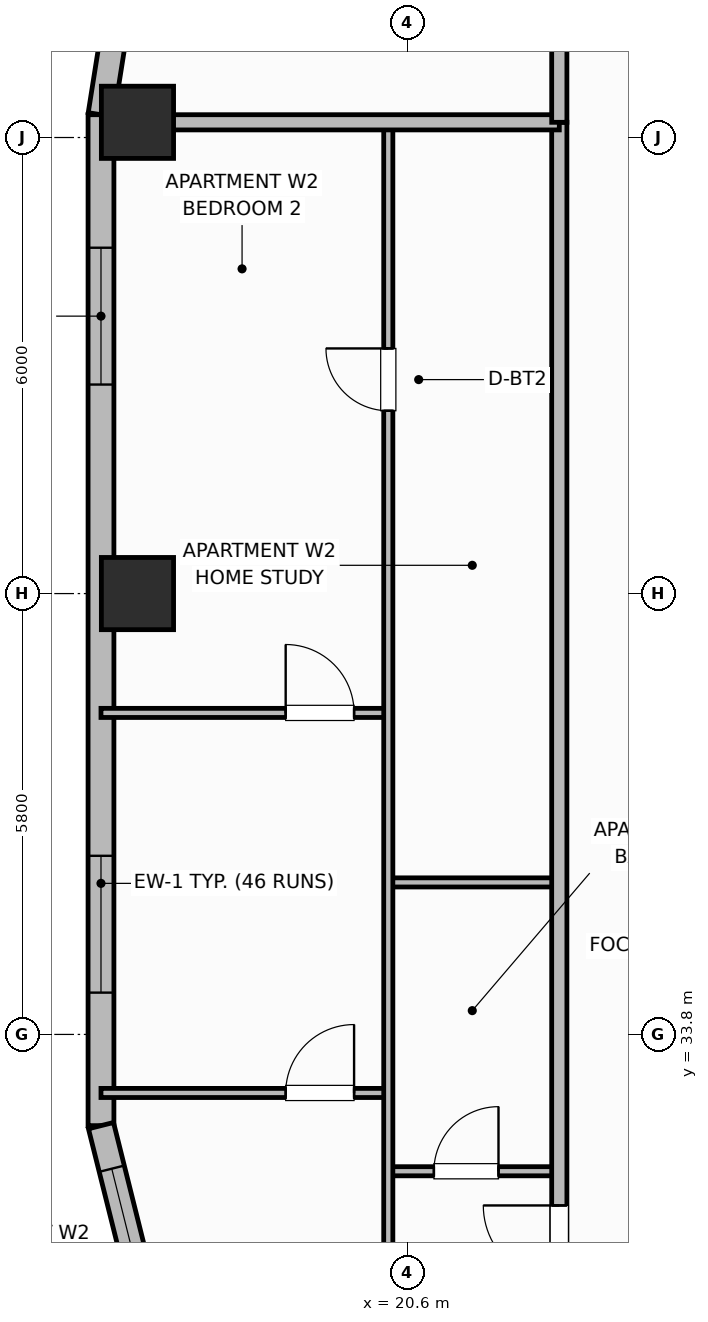
"""IFC4 building model, lengths in metres.
Left out: names, types, materials, properties, quantities, classifications, styles, units other than length and angle.
Written with IfcOpenShell. Run it as: python <this file> out.ifc"""

import sys

from ifc_helpers import new_model, si_unit, direction, frame, frame_2d, origin, origin_2d, place, context, subcontext, project, spatial, rectangle, extrude, element, fill, save


model = new_model("IFC4")
c1 = context("Model", 3, precision=1e-05, world=origin(), true_north=direction((0.0, 1.0)))
c2 = subcontext(c1, "Body", "Model", "MODEL_VIEW")
j1 = project(units=[si_unit("LENGTHUNIT", "METRE"), si_unit("PLANEANGLEUNIT", "RADIAN")], contexts=[c1])
p1 = place(None, origin())
s1 = spatial("IfcSite", under=j1, at=p1, CompositionType="ELEMENT")
p2 = place(p1, origin())
s2 = spatial("IfcBuilding", under=s1, at=p2, CompositionType="ELEMENT")
p3 = place(p2, frame((0.0, 0.0, 147.8)))
s3 = spatial("IfcBuildingStorey", under=s2, at=p3, CompositionType="ELEMENT", Elevation=147.8)
for number, where, z_axis, x_axis in (
    (1, (17.05, 39.6, 0.0), (0.0, 0.0, 1.0), (1.0, 0.0, 0.0)),
    (2, (17.05, 45.8, 0.0), (0.0, 0.0, 1.0), (1.0, 0.0, 0.0)),
):
    element("IfcColumn", number, at=place(p3, frame(where, z_axis=z_axis, x_axis=x_axis)), inside=s3, PredefinedType="COLUMN", context=c2, shape_type="SweptSolid", body=[
        extrude(rectangle(XDim=0.95, YDim=0.95, at=origin_2d()), origin(), (0.0, 0.0, 1.0), 3.7),
    ])
p4 = place(p3, frame((16.748, 47.022, 0.0), z_axis=(0.0, 0.0, 1.0), x_axis=(-0.156481329164, -0.987680916907, 0.0)))
e3 = element("IfcWall", 3, at=p4, inside=s3, PredefinedType="SOLIDWALL", context=c2, shape_type="SweptSolid", body=[
    extrude(rectangle(XDim=1.136, YDim=0.34, at=frame_2d((0.568, 0.0))), origin(), (0.0, 0.0, 1.0), 2.72),
])
p5 = place(p3, frame((16.57, 45.9, 0.0), z_axis=(0.0, 0.0, 1.0), x_axis=(0.0, -1.0, 0.0)))
e4 = element("IfcWall", 4, at=p5, inside=s3, PredefinedType="SOLIDWALL", context=c2, shape_type="SweptSolid", body=[
    extrude(rectangle(XDim=13.3, YDim=0.34, at=frame_2d((6.65, 0.0))), origin(), (0.0, 0.0, 1.0), 2.72),
])
p6 = place(p5, frame((1.75, 0.0, 0.75)))
e5 = element("IfcOpeningElement", 5, at=p6, cuts=e4, PredefinedType="OPENING", context=c2, shape_type="SweptSolid", body=[
    extrude(rectangle(XDim=1.8, YDim=1.85, at=frame_2d((0.9, 0.925))), frame((0.0, 0.18, 0.0), z_axis=(0.0, -1.0, 0.0), x_axis=(1.0, 0.0, 0.0)), (0.0, 0.0, 1.0), 0.36),
])
p7 = place(p5, frame((9.75, 0.0, 0.75)))
e6 = element("IfcOpeningElement", 6, at=p7, cuts=e4, PredefinedType="OPENING", context=c2, shape_type="SweptSolid", body=[
    extrude(rectangle(XDim=1.8, YDim=1.85, at=frame_2d((0.9, 0.925))), frame((0.0, 0.18, 0.0), z_axis=(0.0, -1.0, 0.0), x_axis=(1.0, 0.0, 0.0)), (0.0, 0.0, 1.0), 0.36),
])
p8 = place(p3, frame((16.57, 32.6, 0.0), z_axis=(0.0, 0.0, 1.0), x_axis=(0.242535625036, -0.970142500145, 0.0)))
e7 = element("IfcWall", 7, at=p8, inside=s3, PredefinedType="SOLIDWALL", context=c2, shape_type="SweptSolid", body=[
    extrude(rectangle(XDim=2.268, YDim=0.34, at=frame_2d((1.134, 0.0))), origin(), (0.0, 0.0, 1.0), 2.72),
])
p9 = place(p8, frame((0.584, 0.0, 0.91)))
e8 = element("IfcOpeningElement", 8, at=p9, cuts=e7, PredefinedType="OPENING", context=c2, shape_type="SweptSolid", body=[
    extrude(rectangle(XDim=1.1, YDim=1.65, at=frame_2d((0.55, 0.825))), frame((0.0, 0.18, 0.0), z_axis=(0.0, -1.0, 0.0), x_axis=(1.0, 0.0, 0.0)), (0.0, 0.0, 1.0), 0.36),
])
p10 = place(p3, frame((20.35, 32.0, 0.0), z_axis=(0.0, 0.0, 1.0), x_axis=(1.0, 0.0, 0.0)))
e9 = element("IfcWall", 9, at=p10, inside=s3, PredefinedType="PARTITIONING", context=c2, shape_type="SweptSolid", body=[
    extrude(rectangle(XDim=2.25, YDim=0.12, at=frame_2d((1.125, 0.0))), origin(), (0.0, 0.0, 1.0), 2.55),
])
p11 = place(p10, frame((0.6, 0.0, 0.0)))
e10 = element("IfcOpeningElement", 10, at=p11, cuts=e9, PredefinedType="OPENING", context=c2, shape_type="SweptSolid", body=[
    extrude(rectangle(XDim=0.85, YDim=2.1, at=frame_2d((0.425, 1.05))), frame((0.0, 0.07, 0.0), z_axis=(0.0, -1.0, 0.0), x_axis=(1.0, 0.0, 0.0)), (0.0, 0.0, 1.0), 0.14),
])
p12 = place(p3, frame((20.35, 35.8, 0.0), z_axis=(0.0, 0.0, 1.0), x_axis=(1.0, 0.0, 0.0)))
e11 = element("IfcWall", 11, at=p12, inside=s3, PredefinedType="PARTITIONING", context=c2, shape_type="SweptSolid", body=[
    extrude(rectangle(XDim=2.25, YDim=0.12, at=frame_2d((1.125, 0.0))), origin(), (0.0, 0.0, 1.0), 2.55),
])
p13 = place(p3, frame((16.57, 33.03, 0.0), z_axis=(0.0, 0.0, 1.0), x_axis=(1.0, 0.0, 0.0)))
e12 = element("IfcWall", 12, at=p13, inside=s3, PredefinedType="PARTITIONING", context=c2, shape_type="SweptSolid", body=[
    extrude(rectangle(XDim=3.78, YDim=0.12, at=frame_2d((1.89, 0.0))), origin(), (0.0, 0.0, 1.0), 2.55),
])
p14 = place(p13, frame((2.43, 0.0, 0.0)))
e13 = element("IfcOpeningElement", 13, at=p14, cuts=e12, PredefinedType="OPENING", context=c2, shape_type="SweptSolid", body=[
    extrude(rectangle(XDim=0.9, YDim=2.1, at=frame_2d((0.45, 1.05))), frame((0.0, 0.07, 0.0), z_axis=(0.0, -1.0, 0.0), x_axis=(1.0, 0.0, 0.0)), (0.0, 0.0, 1.0), 0.14),
])
p15 = place(p3, frame((16.57, 38.03, 0.0), z_axis=(0.0, 0.0, 1.0), x_axis=(1.0, 0.0, 0.0)))
e14 = element("IfcWall", 14, at=p15, inside=s3, PredefinedType="PARTITIONING", context=c2, shape_type="SweptSolid", body=[
    extrude(rectangle(XDim=3.78, YDim=0.12, at=frame_2d((1.89, 0.0))), origin(), (0.0, 0.0, 1.0), 2.55),
])
p16 = place(p15, frame((2.43, 0.0, 0.0)))
e15 = element("IfcOpeningElement", 15, at=p16, cuts=e14, PredefinedType="OPENING", context=c2, shape_type="SweptSolid", body=[
    extrude(rectangle(XDim=0.9, YDim=2.1, at=frame_2d((0.45, 1.05))), frame((0.0, 0.07, 0.0), z_axis=(0.0, -1.0, 0.0), x_axis=(1.0, 0.0, 0.0)), (0.0, 0.0, 1.0), 0.14),
])
p17 = place(p3, frame((20.35, 26.64, 0.0), z_axis=(0.0, 0.0, 1.0), x_axis=(0.0, 1.0, 0.0)))
e16 = element("IfcWall", 16, at=p17, inside=s3, PredefinedType="PARTITIONING", context=c2, shape_type="SweptSolid", body=[
    extrude(rectangle(XDim=19.12, YDim=0.12, at=frame_2d((9.56, 0.0))), origin(), (0.0, 0.0, 1.0), 2.55),
])
p18 = place(p17, frame((2.81, 0.0, 0.0)))
e17 = element("IfcOpeningElement", 17, at=p18, cuts=e16, PredefinedType="OPENING", context=c2, shape_type="SweptSolid", body=[
    extrude(rectangle(XDim=0.9, YDim=2.1, at=frame_2d((0.45, 1.05))), frame((0.0, 0.07, 0.0), z_axis=(0.0, -1.0, 0.0), x_axis=(1.0, 0.0, 0.0)), (0.0, 0.0, 1.0), 0.14),
])
p19 = place(p17, frame((15.365, 0.0, 0.0)))
e18 = element("IfcOpeningElement", 18, at=p19, cuts=e16, PredefinedType="OPENING", context=c2, shape_type="SweptSolid", body=[
    extrude(rectangle(XDim=0.82, YDim=2.08, at=frame_2d((0.41, 1.04))), frame((0.0, 0.07, 0.0), z_axis=(0.0, -1.0, 0.0), x_axis=(1.0, 0.0, 0.0)), (0.0, 0.0, 1.0), 0.14),
])
p20 = place(p3, frame((22.6, 10.6, 0.0), z_axis=(0.0, 0.0, 1.0), x_axis=(0.0, 1.0, 0.0)))
e19 = element("IfcWall", 19, at=p20, inside=s3, PredefinedType="PARTITIONING", context=c2, shape_type="SweptSolid", body=[
    extrude(rectangle(XDim=35.2, YDim=0.2, at=frame_2d((17.6, 0.0))), origin(), (0.0, 0.0, 1.0), 2.55),
])
p21 = place(p20, frame((2.65, 0.0, 0.0)))
e20 = element("IfcOpeningElement", 20, at=p21, cuts=e19, PredefinedType="OPENING", context=c2, shape_type="SweptSolid", body=[
    extrude(rectangle(XDim=1.0, YDim=2.15, at=frame_2d((0.5, 1.075))), frame((0.0, 0.11, 0.0), z_axis=(0.0, -1.0, 0.0), x_axis=(1.0, 0.0, 0.0)), (0.0, 0.0, 1.0), 0.22),
])
p22 = place(p20, frame((19.95, 0.0, 0.0)))
e21 = element("IfcOpeningElement", 21, at=p22, cuts=e19, PredefinedType="OPENING", context=c2, shape_type="SweptSolid", body=[
    extrude(rectangle(XDim=1.0, YDim=2.15, at=frame_2d((0.5, 1.075))), frame((0.0, 0.11, 0.0), z_axis=(0.0, -1.0, 0.0), x_axis=(1.0, 0.0, 0.0)), (0.0, 0.0, 1.0), 0.22),
])
p23 = place(p3, frame((16.99, 45.8, 0.0), z_axis=(0.0, 0.0, 1.0), x_axis=(1.0, 0.0, 0.0)))
e22 = element("IfcWall", 22, at=p23, inside=s3, PredefinedType="PARTITIONING", context=c2, shape_type="SweptSolid", body=[
    extrude(rectangle(XDim=5.61, YDim=0.2, at=frame_2d((2.805, 0.0))), origin(), (0.0, 0.0, 1.0), 2.55),
])
p24 = place(p3, frame((22.6, 45.8, 0.0), z_axis=(0.0, 0.0, 1.0), x_axis=(0.0, 1.0, 0.0)))
e23 = element("IfcWall", 23, at=p24, inside=s3, PredefinedType="PARTITIONING", context=c2, shape_type="SweptSolid", body=[
    extrude(rectangle(XDim=3.73, YDim=0.2, at=frame_2d((1.865, 0.0))), origin(), (0.0, 0.0, 1.0), 2.55),
])
p25 = place(p6, origin())
e24 = element("IfcWindow", 24, at=p25, inside=s3, PartitioningType="SINGLE_PANEL", PredefinedType="WINDOW", context=c2, shape_type="SweptSolid", body=[
    extrude(rectangle(XDim=1.8, YDim=1.85, at=frame_2d((0.9, 0.925))), frame((0.0, 0.03, 0.0), z_axis=(0.0, -1.0, 0.0), x_axis=(1.0, 0.0, 0.0)), (0.0, 0.0, 1.0), 0.06),
])
fill(e5, e24)
p26 = place(p7, origin())
e25 = element("IfcWindow", 25, at=p26, inside=s3, PartitioningType="SINGLE_PANEL", PredefinedType="WINDOW", context=c2, shape_type="SweptSolid", body=[
    extrude(rectangle(XDim=1.8, YDim=1.85, at=frame_2d((0.9, 0.925))), frame((0.0, 0.03, 0.0), z_axis=(0.0, -1.0, 0.0), x_axis=(1.0, 0.0, 0.0)), (0.0, 0.0, 1.0), 0.06),
])
fill(e6, e25)
p27 = place(p9, origin())
e26 = element("IfcWindow", 26, at=p27, inside=s3, PartitioningType="SINGLE_PANEL", PredefinedType="WINDOW", context=c2, shape_type="SweptSolid", body=[
    extrude(rectangle(XDim=1.1, YDim=1.65, at=frame_2d((0.55, 0.825))), frame((0.0, 0.03, 0.0), z_axis=(0.0, -1.0, 0.0), x_axis=(1.0, 0.0, 0.0)), (0.0, 0.0, 1.0), 0.06),
])
fill(e8, e26)
p28 = place(p11, origin())
e27 = element("IfcDoor", 27, at=p28, inside=s3, OperationType="SINGLE_SWING_RIGHT", PredefinedType="DOOR", context=c2, shape_type="SweptSolid", body=[
    extrude(rectangle(XDim=0.85, YDim=2.1, at=frame_2d((0.425, 1.05))), frame((0.0, 0.025, 0.0), z_axis=(0.0, -1.0, 0.0), x_axis=(1.0, 0.0, 0.0)), (0.0, 0.0, 1.0), 0.05),
])
fill(e10, e27)
p29 = place(p14, origin())
e28 = element("IfcDoor", 28, at=p29, inside=s3, OperationType="SINGLE_SWING_RIGHT", PredefinedType="DOOR", context=c2, shape_type="SweptSolid", body=[
    extrude(rectangle(XDim=0.9, YDim=2.1, at=frame_2d((0.45, 1.05))), frame((0.0, 0.025, 0.0), z_axis=(0.0, -1.0, 0.0), x_axis=(1.0, 0.0, 0.0)), (0.0, 0.0, 1.0), 0.05),
])
fill(e13, e28)
p30 = place(p16, origin())
e29 = element("IfcDoor", 29, at=p30, inside=s3, OperationType="SINGLE_SWING_LEFT", PredefinedType="DOOR", context=c2, shape_type="SweptSolid", body=[
    extrude(rectangle(XDim=0.9, YDim=2.1, at=frame_2d((0.45, 1.05))), frame((0.0, 0.025, 0.0), z_axis=(0.0, -1.0, 0.0), x_axis=(1.0, 0.0, 0.0)), (0.0, 0.0, 1.0), 0.05),
])
fill(e15, e29)
p31 = place(p19, origin())
e30 = element("IfcDoor", 30, at=p31, inside=s3, OperationType="SINGLE_SWING_RIGHT", PredefinedType="DOOR", context=c2, shape_type="SweptSolid", body=[
    extrude(rectangle(XDim=0.82, YDim=2.08, at=frame_2d((0.41, 1.04))), frame((0.0, 0.025, 0.0), z_axis=(0.0, -1.0, 0.0), x_axis=(1.0, 0.0, 0.0)), (0.0, 0.0, 1.0), 0.05),
])
fill(e18, e30)
p32 = place(p22, origin())
e31 = element("IfcDoor", 31, at=p32, inside=s3, OperationType="SINGLE_SWING_RIGHT", PredefinedType="DOOR", context=c2, shape_type="SweptSolid", body=[
    extrude(rectangle(XDim=1.0, YDim=2.15, at=frame_2d((0.5, 1.075))), frame((0.0, 0.025, 0.0), z_axis=(0.0, -1.0, 0.0), x_axis=(1.0, 0.0, 0.0)), (0.0, 0.0, 1.0), 0.05),
])
fill(e21, e31)
save(model, sys.argv[1])
